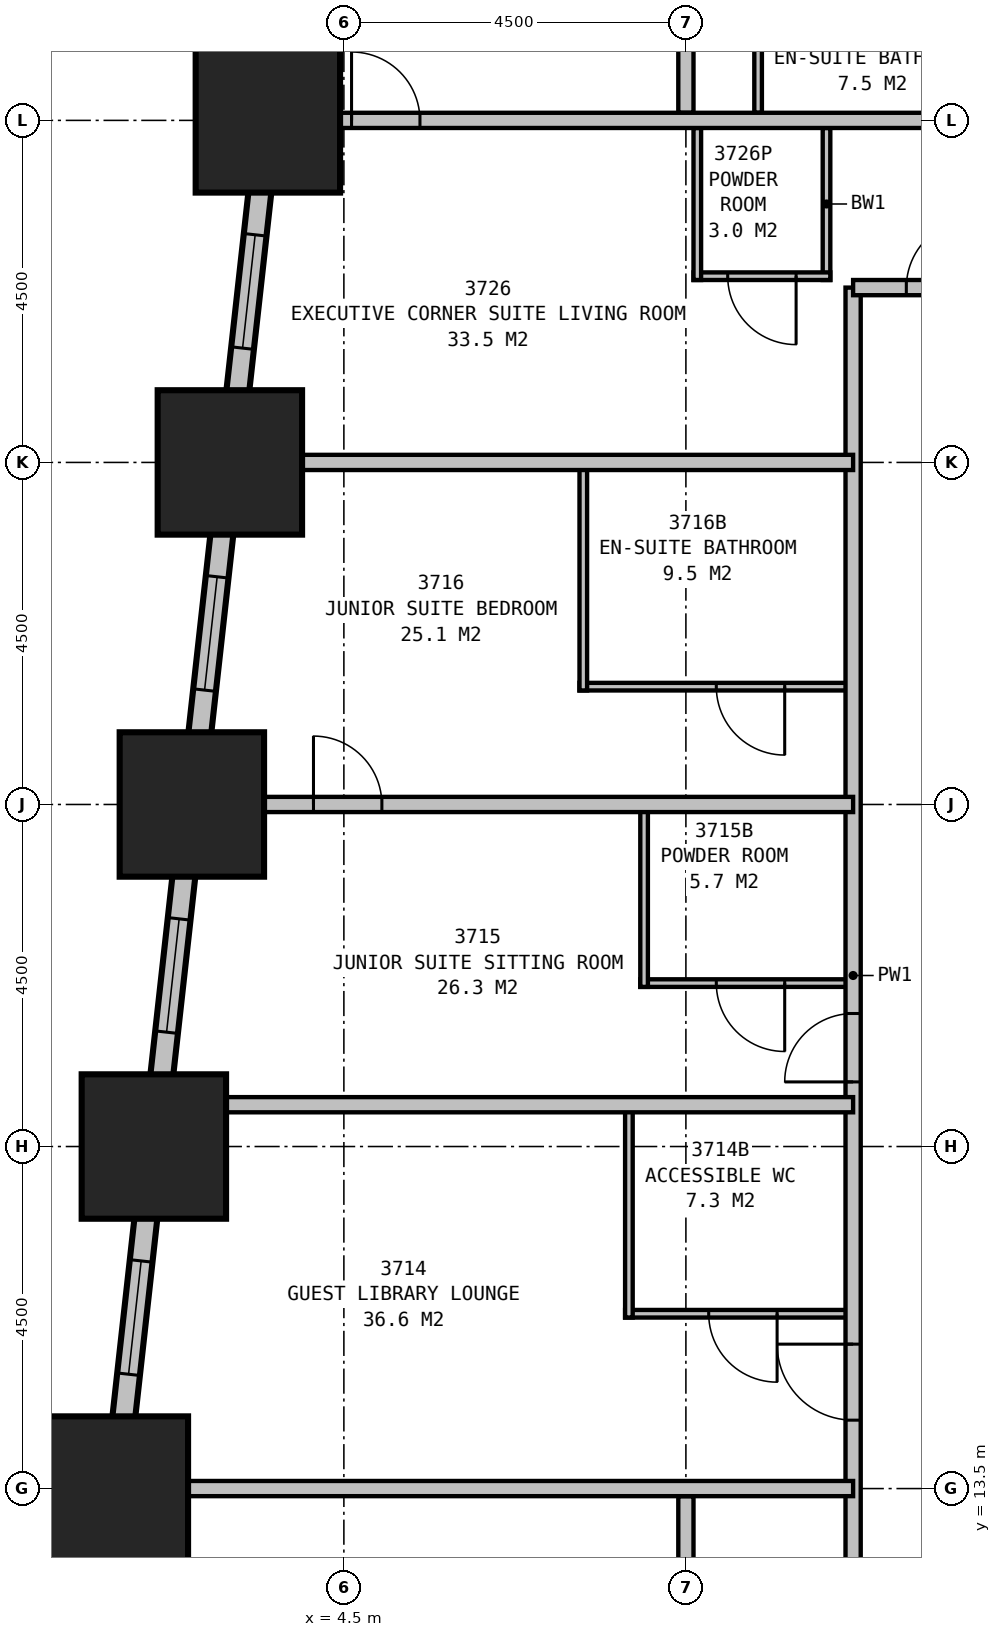
"""IFC4 building model, lengths in metres.
Left out: names, types, materials, properties, quantities, classifications, styles, units other than length and angle.
Written with IfcOpenShell. Run it as: python <this file> out.ifc"""

import sys

from ifc_helpers import new_model, si_unit, direction, frame, frame_2d, origin, origin_2d, place, context, subcontext, project, spatial, rectangle, extrude, element, fill, save


model = new_model("IFC4")
c1 = context("Model", 3, precision=1e-05, world=origin(), true_north=direction((0.0, 1.0)))
c2 = subcontext(c1, "Body", "Model", "MODEL_VIEW")
j1 = project(units=[si_unit("LENGTHUNIT", "METRE"), si_unit("PLANEANGLEUNIT", "RADIAN")], contexts=[c1])
p1 = place(None, origin())
s1 = spatial("IfcSite", under=j1, at=p1, CompositionType="ELEMENT")
p2 = place(p1, origin())
s2 = spatial("IfcBuilding", under=s1, at=p2, CompositionType="ELEMENT")
p3 = place(p2, frame((0.0, 0.0, 142.4)))
s3 = spatial("IfcBuildingStorey", under=s2, at=p3, CompositionType="ELEMENT", Elevation=142.4)
for number, where, z_axis, x_axis in (
    (1, (3.5, 31.5, 0.0), (0.0, 0.0, 1.0), (1.0, 0.0, 0.0)),
    (2, (3.0, 27.0, 0.0), (0.0, 0.0, 1.0), (1.0, 0.0, 0.0)),
    (3, (2.5, 22.5, 0.0), (0.0, 0.0, 1.0), (1.0, 0.0, 0.0)),
    (4, (2.0, 18.0, 0.0), (0.0, 0.0, 1.0), (1.0, 0.0, 0.0)),
    (5, (1.5, 13.5, 0.0), (0.0, 0.0, 1.0), (1.0, 0.0, 0.0)),
):
    element("IfcColumn", number, at=place(p3, frame(where, z_axis=z_axis, x_axis=x_axis)), inside=s3, PredefinedType="COLUMN", context=c2, shape_type="SweptSolid", body=[
        extrude(rectangle(XDim=1.9, YDim=1.9, at=origin_2d()), origin(), (0.0, 0.0, 1.0), 3.5),
    ])
p4 = place(p3, frame((4.017, 36.149, 0.0), z_axis=(0.0, 0.0, 1.0), x_axis=(-0.110433201132, -0.993883548555, 0.0)))
e6 = element("IfcWall", 6, at=p4, inside=s3, PredefinedType="STANDARD", context=c2, shape_type="SweptSolid", body=[
    extrude(rectangle(XDim=31.994, YDim=0.3, at=frame_2d((15.997, 0.0))), origin(), (0.0, 0.0, 1.0), 2.1),
])
p5 = place(p4, frame((1.664, 0.0, 0.5)))
e7 = element("IfcOpeningElement", 7, at=p5, cuts=e6, PredefinedType="OPENING", context=c2, shape_type="SweptSolid", body=[
    extrude(rectangle(XDim=1.5, YDim=1.4, at=frame_2d((0.75, 0.7))), frame((0.0, 0.16, 0.0), z_axis=(0.0, -1.0, 0.0), x_axis=(1.0, 0.0, 0.0)), (0.0, 0.0, 1.0), 0.32),
])
p6 = place(p4, frame((6.192, 0.0, 0.5)))
e8 = element("IfcOpeningElement", 8, at=p6, cuts=e6, PredefinedType="OPENING", context=c2, shape_type="SweptSolid", body=[
    extrude(rectangle(XDim=1.5, YDim=1.4, at=frame_2d((0.75, 0.7))), frame((0.0, 0.16, 0.0), z_axis=(0.0, -1.0, 0.0), x_axis=(1.0, 0.0, 0.0)), (0.0, 0.0, 1.0), 0.32),
])
p7 = place(p4, frame((10.719, 0.0, 0.5)))
e9 = element("IfcOpeningElement", 9, at=p7, cuts=e6, PredefinedType="OPENING", context=c2, shape_type="SweptSolid", body=[
    extrude(rectangle(XDim=1.5, YDim=1.4, at=frame_2d((0.75, 0.7))), frame((0.0, 0.16, 0.0), z_axis=(0.0, -1.0, 0.0), x_axis=(1.0, 0.0, 0.0)), (0.0, 0.0, 1.0), 0.32),
])
p8 = place(p4, frame((15.247, 0.0, 0.5)))
e10 = element("IfcOpeningElement", 10, at=p8, cuts=e6, PredefinedType="OPENING", context=c2, shape_type="SweptSolid", body=[
    extrude(rectangle(XDim=1.5, YDim=1.4, at=frame_2d((0.75, 0.7))), frame((0.0, 0.16, 0.0), z_axis=(0.0, -1.0, 0.0), x_axis=(1.0, 0.0, 0.0)), (0.0, 0.0, 1.0), 0.32),
])
p9 = place(p4, frame((19.775, 0.0, 0.5)))
e11 = element("IfcOpeningElement", 11, at=p9, cuts=e6, PredefinedType="OPENING", context=c2, shape_type="SweptSolid", body=[
    extrude(rectangle(XDim=1.5, YDim=1.4, at=frame_2d((0.75, 0.7))), frame((0.0, 0.16, 0.0), z_axis=(0.0, -1.0, 0.0), x_axis=(1.0, 0.0, 0.0)), (0.0, 0.0, 1.0), 0.32),
])
p10 = place(p4, frame((24.302, 0.0, 0.5)))
e12 = element("IfcOpeningElement", 12, at=p10, cuts=e6, PredefinedType="OPENING", context=c2, shape_type="SweptSolid", body=[
    extrude(rectangle(XDim=1.5, YDim=1.4, at=frame_2d((0.75, 0.7))), frame((0.0, 0.16, 0.0), z_axis=(0.0, -1.0, 0.0), x_axis=(1.0, 0.0, 0.0)), (0.0, 0.0, 1.0), 0.32),
])
p11 = place(p4, frame((28.83, 0.0, 0.5)))
e13 = element("IfcOpeningElement", 13, at=p11, cuts=e6, PredefinedType="OPENING", context=c2, shape_type="SweptSolid", body=[
    extrude(rectangle(XDim=1.5, YDim=1.4, at=frame_2d((0.75, 0.7))), frame((0.0, 0.16, 0.0), z_axis=(0.0, -1.0, 0.0), x_axis=(1.0, 0.0, 0.0)), (0.0, 0.0, 1.0), 0.32),
])
p12 = place(p3, frame((11.2, 29.3, 0.0), z_axis=(0.0, 0.0, 1.0), x_axis=(1.0, 0.0, 0.0)))
e14 = element("IfcWall", 14, at=p12, inside=s3, PredefinedType="PARTITIONING", context=c2, shape_type="SweptSolid", body=[
    extrude(rectangle(XDim=2.4, YDim=0.2, at=frame_2d((1.2, 0.0))), origin(), (0.0, 0.0, 1.0), 3.25),
])
p13 = place(p12, frame((0.7, 0.0, 0.0)))
e15 = element("IfcOpeningElement", 15, at=p13, cuts=e14, PredefinedType="OPENING", context=c2, shape_type="SweptSolid", body=[
    extrude(rectangle(XDim=0.9, YDim=2.1, at=frame_2d((0.45, 1.05))), frame((0.0, 0.11, 0.0), z_axis=(0.0, -1.0, 0.0), x_axis=(1.0, 0.0, 0.0)), (0.0, 0.0, 1.0), 0.22),
])
p14 = place(p3, frame((11.2, 11.2, 0.0), z_axis=(0.0, 0.0, 1.0), x_axis=(0.0, 1.0, 0.0)))
e16 = element("IfcWall", 16, at=p14, inside=s3, PredefinedType="PARTITIONING", context=c2, shape_type="SweptSolid", body=[
    extrude(rectangle(XDim=18.1, YDim=0.2, at=frame_2d((9.05, 0.0))), origin(), (0.0, 0.0, 1.0), 3.25),
])
p15 = place(p14, frame((3.2, 0.0, 0.0)))
e17 = element("IfcOpeningElement", 17, at=p15, cuts=e16, PredefinedType="OPENING", context=c2, shape_type="SweptSolid", body=[
    extrude(rectangle(XDim=1.0, YDim=2.1, at=frame_2d((0.5, 1.05))), frame((0.0, 0.11, 0.0), z_axis=(0.0, -1.0, 0.0), x_axis=(1.0, 0.0, 0.0)), (0.0, 0.0, 1.0), 0.22),
])
p16 = place(p14, frame((7.65, 0.0, 0.0)))
e18 = element("IfcOpeningElement", 18, at=p16, cuts=e16, PredefinedType="OPENING", context=c2, shape_type="SweptSolid", body=[
    extrude(rectangle(XDim=0.9, YDim=2.1, at=frame_2d((0.45, 1.05))), frame((0.0, 0.11, 0.0), z_axis=(0.0, -1.0, 0.0), x_axis=(1.0, 0.0, 0.0)), (0.0, 0.0, 1.0), 0.22),
])
p17 = place(p3, frame((11.2, 18.55, 0.0), z_axis=(0.0, 0.0, 1.0), x_axis=(-1.0, 0.0, 0.0)))
e19 = element("IfcWall", 19, at=p17, inside=s3, PredefinedType="PARTITIONING", context=c2, shape_type="SweptSolid", body=[
    extrude(rectangle(XDim=9.138, YDim=0.2, at=frame_2d((4.569, 0.0))), origin(), (0.0, 0.0, 1.0), 3.25),
])
p18 = place(p3, frame((11.2, 22.5, 0.0), z_axis=(0.0, 0.0, 1.0), x_axis=(-1.0, 0.0, 0.0)))
e20 = element("IfcWall", 20, at=p18, inside=s3, PredefinedType="PARTITIONING", context=c2, shape_type="SweptSolid", body=[
    extrude(rectangle(XDim=8.699, YDim=0.2, at=frame_2d((4.35, 0.0))), origin(), (0.0, 0.0, 1.0), 2.2),
])
p19 = place(p18, frame((7.1, 0.0, 0.0), z_axis=(0.0, 0.0, 1.0), x_axis=(-1.0, 0.0, 0.0)))
e21 = element("IfcOpeningElement", 21, at=p19, cuts=e20, PredefinedType="OPENING", context=c2, shape_type="SweptSolid", body=[
    extrude(rectangle(XDim=0.9, YDim=2.1, at=frame_2d((0.45, 1.05))), frame((0.0, 0.11, 0.0), z_axis=(0.0, -1.0, 0.0), x_axis=(1.0, 0.0, 0.0)), (0.0, 0.0, 1.0), 0.22),
])
p20 = place(p3, frame((8.25, 15.75, 0.0), z_axis=(0.0, 0.0, 1.0), x_axis=(0.0, 1.0, 0.0)))
e22 = element("IfcWall", 22, at=p20, inside=s3, PredefinedType="PLUMBINGWALL", context=c2, shape_type="SweptSolid", body=[
    extrude(rectangle(XDim=2.8, YDim=0.1, at=frame_2d((1.4, 0.0))), origin(), (0.0, 0.0, 1.0), 3.25),
])
p21 = place(p3, frame((11.2, 15.8, 0.0), z_axis=(0.0, 0.0, 1.0), x_axis=(-1.0, 0.0, 0.0)))
e23 = element("IfcWall", 23, at=p21, inside=s3, PredefinedType="PLUMBINGWALL", context=c2, shape_type="SweptSolid", body=[
    extrude(rectangle(XDim=3.0, YDim=0.1, at=frame_2d((1.5, 0.0))), origin(), (0.0, 0.0, 1.0), 3.25),
])
p22 = place(p21, frame((1.0, 0.0, 0.0)))
e24 = element("IfcOpeningElement", 24, at=p22, cuts=e23, PredefinedType="OPENING", context=c2, shape_type="SweptSolid", body=[
    extrude(rectangle(XDim=0.9, YDim=2.1, at=frame_2d((0.45, 1.05))), frame((0.0, 0.06, 0.0), z_axis=(0.0, -1.0, 0.0), x_axis=(1.0, 0.0, 0.0)), (0.0, 0.0, 1.0), 0.12),
])
p23 = place(p3, frame((8.45, 20.1, 0.0), z_axis=(0.0, 0.0, 1.0), x_axis=(0.0, 1.0, 0.0)))
e25 = element("IfcWall", 25, at=p23, inside=s3, PredefinedType="PLUMBINGWALL", context=c2, shape_type="SweptSolid", body=[
    extrude(rectangle(XDim=2.4, YDim=0.1, at=frame_2d((1.2, 0.0))), origin(), (0.0, 0.0, 1.0), 3.25),
])
p24 = place(p3, frame((11.2, 20.15, 0.0), z_axis=(0.0, 0.0, 1.0), x_axis=(-1.0, 0.0, 0.0)))
e26 = element("IfcWall", 26, at=p24, inside=s3, PredefinedType="PLUMBINGWALL", context=c2, shape_type="SweptSolid", body=[
    extrude(rectangle(XDim=2.8, YDim=0.1, at=frame_2d((1.4, 0.0))), origin(), (0.0, 0.0, 1.0), 3.25),
])
p25 = place(p24, frame((0.9, 0.0, 0.0)))
e27 = element("IfcOpeningElement", 27, at=p25, cuts=e26, PredefinedType="OPENING", context=c2, shape_type="SweptSolid", body=[
    extrude(rectangle(XDim=0.9, YDim=2.1, at=frame_2d((0.45, 1.05))), frame((0.0, 0.06, 0.0), z_axis=(0.0, -1.0, 0.0), x_axis=(1.0, 0.0, 0.0)), (0.0, 0.0, 1.0), 0.12),
])
p26 = place(p3, frame((7.65, 24.0, 0.0), z_axis=(0.0, 0.0, 1.0), x_axis=(0.0, 1.0, 0.0)))
e28 = element("IfcWall", 28, at=p26, inside=s3, PredefinedType="PLUMBINGWALL", context=c2, shape_type="SweptSolid", body=[
    extrude(rectangle(XDim=3.0, YDim=0.1, at=frame_2d((1.5, 0.0))), origin(), (0.0, 0.0, 1.0), 3.25),
])
p27 = place(p3, frame((11.2, 24.05, 0.0), z_axis=(0.0, 0.0, 1.0), x_axis=(-1.0, 0.0, 0.0)))
e29 = element("IfcWall", 29, at=p27, inside=s3, PredefinedType="PLUMBINGWALL", context=c2, shape_type="SweptSolid", body=[
    extrude(rectangle(XDim=3.6, YDim=0.1, at=frame_2d((1.8, 0.0))), origin(), (0.0, 0.0, 1.0), 3.25),
])
p28 = place(p27, frame((0.9, 0.0, 0.0)))
e30 = element("IfcOpeningElement", 30, at=p28, cuts=e29, PredefinedType="OPENING", context=c2, shape_type="SweptSolid", body=[
    extrude(rectangle(XDim=0.9, YDim=2.1, at=frame_2d((0.45, 1.05))), frame((0.0, 0.06, 0.0), z_axis=(0.0, -1.0, 0.0), x_axis=(1.0, 0.0, 0.0)), (0.0, 0.0, 1.0), 0.12),
])
p29 = place(p3, frame((11.2, 13.5, 0.0), z_axis=(0.0, 0.0, 1.0), x_axis=(-1.0, 0.0, 0.0)))
e31 = element("IfcWall", 31, at=p29, inside=s3, PredefinedType="PARTITIONING", context=c2, shape_type="SweptSolid", body=[
    extrude(rectangle(XDim=9.921, YDim=0.2, at=frame_2d((4.96, 0.0))), origin(), (0.0, 0.0, 1.0), 1.9),
])
p30 = place(p3, frame((9.0, 4.6, 0.0), z_axis=(0.0, 0.0, 1.0), x_axis=(0.0, 1.0, 0.0)))
e32 = element("IfcWall", 32, at=p30, inside=s3, PredefinedType="PARTITIONING", context=c2, shape_type="SweptSolid", body=[
    extrude(rectangle(XDim=8.8, YDim=0.2, at=frame_2d((4.4, 0.0))), origin(), (0.0, 0.0, 1.0), 2.2),
])
p31 = place(p30, frame((4.05, 0.0, 0.0)))
e33 = element("IfcOpeningElement", 33, at=p31, cuts=e32, PredefinedType="OPENING", context=c2, shape_type="SweptSolid", body=[
    extrude(rectangle(XDim=0.9, YDim=2.1, at=frame_2d((0.45, 1.05))), frame((0.0, 0.11, 0.0), z_axis=(0.0, -1.0, 0.0), x_axis=(1.0, 0.0, 0.0)), (0.0, 0.0, 1.0), 0.22),
])
p32 = place(p3, frame((11.2, 27.0, 0.0), z_axis=(0.0, 0.0, 1.0), x_axis=(-1.0, 0.0, 0.0)))
e34 = element("IfcWall", 34, at=p32, inside=s3, PredefinedType="PARTITIONING", context=c2, shape_type="SweptSolid", body=[
    extrude(rectangle(XDim=7.977, YDim=0.2, at=frame_2d((3.988, 0.0))), origin(), (0.0, 0.0, 1.0), 1.9),
])
p33 = place(p3, frame((13.6, 31.5, 0.0), z_axis=(0.0, 0.0, 1.0), x_axis=(-1.0, 0.0, 0.0)))
e35 = element("IfcWall", 35, at=p33, inside=s3, PredefinedType="PARTITIONING", context=c2, shape_type="SweptSolid", body=[
    extrude(rectangle(XDim=10.099, YDim=0.2, at=frame_2d((5.05, 0.0))), origin(), (0.0, 0.0, 1.0), 3.25),
])
p34 = place(p33, frame((8.999, 0.0, 0.0), z_axis=(0.0, 0.0, 1.0), x_axis=(-1.0, 0.0, 0.0)))
e36 = element("IfcOpeningElement", 36, at=p34, cuts=e35, PredefinedType="OPENING", context=c2, shape_type="SweptSolid", body=[
    extrude(rectangle(XDim=0.9, YDim=2.1, at=frame_2d((0.45, 1.05))), frame((0.0, 0.11, 0.0), z_axis=(0.0, -1.0, 0.0), x_axis=(1.0, 0.0, 0.0)), (0.0, 0.0, 1.0), 0.22),
])
p35 = place(p3, frame((9.15, 31.4, 0.0), z_axis=(0.0, 0.0, 1.0), x_axis=(0.0, -1.0, 0.0)))
e37 = element("IfcWall", 37, at=p35, inside=s3, PredefinedType="PLUMBINGWALL", context=c2, shape_type="SweptSolid", body=[
    extrude(rectangle(XDim=2.0, YDim=0.1, at=frame_2d((1.0, 0.0))), origin(), (0.0, 0.0, 1.0), 2.2),
])
p36 = place(p3, frame((10.85, 31.4, 0.0), z_axis=(0.0, 0.0, 1.0), x_axis=(0.0, -1.0, 0.0)))
e38 = element("IfcWall", 38, at=p36, inside=s3, PredefinedType="PLUMBINGWALL", context=c2, shape_type="SweptSolid", body=[
    extrude(rectangle(XDim=2.0, YDim=0.1, at=frame_2d((1.0, 0.0))), origin(), (0.0, 0.0, 1.0), 3.25),
])
p37 = place(p3, frame((10.9, 29.45, 0.0), z_axis=(0.0, 0.0, 1.0), x_axis=(-1.0, 0.0, 0.0)))
e39 = element("IfcWall", 39, at=p37, inside=s3, PredefinedType="PLUMBINGWALL", context=c2, shape_type="SweptSolid", body=[
    extrude(rectangle(XDim=1.8, YDim=0.1, at=frame_2d((0.9, 0.0))), origin(), (0.0, 0.0, 1.0), 3.25),
])
p38 = place(p37, frame((0.45, 0.0, 0.0)))
e40 = element("IfcOpeningElement", 40, at=p38, cuts=e39, PredefinedType="OPENING", context=c2, shape_type="SweptSolid", body=[
    extrude(rectangle(XDim=0.9, YDim=2.1, at=frame_2d((0.45, 1.05))), frame((0.0, 0.06, 0.0), z_axis=(0.0, -1.0, 0.0), x_axis=(1.0, 0.0, 0.0)), (0.0, 0.0, 1.0), 0.12),
])
p39 = place(p3, frame((9.0, 31.6, 0.0), z_axis=(0.0, 0.0, 1.0), x_axis=(0.0, 1.0, 0.0)))
e41 = element("IfcWall", 41, at=p39, inside=s3, PredefinedType="PARTITIONING", context=c2, shape_type="SweptSolid", body=[
    extrude(rectangle(XDim=4.4, YDim=0.2, at=frame_2d((2.2, 0.0))), origin(), (0.0, 0.0, 1.0), 2.2),
])
p40 = place(p39, frame((3.3, 0.0, 0.0), z_axis=(0.0, 0.0, 1.0), x_axis=(-1.0, 0.0, 0.0)))
e42 = element("IfcOpeningElement", 42, at=p40, cuts=e41, PredefinedType="OPENING", context=c2, shape_type="SweptSolid", body=[
    extrude(rectangle(XDim=0.9, YDim=2.1, at=frame_2d((0.45, 1.05))), frame((0.0, 0.11, 0.0), z_axis=(0.0, -1.0, 0.0), x_axis=(1.0, 0.0, 0.0)), (0.0, 0.0, 1.0), 0.22),
])
p41 = place(p3, frame((9.95, 31.6, 0.0), z_axis=(0.0, 0.0, 1.0), x_axis=(0.0, 1.0, 0.0)))
e43 = element("IfcWall", 43, at=p41, inside=s3, PredefinedType="PLUMBINGWALL", context=c2, shape_type="SweptSolid", body=[
    extrude(rectangle(XDim=2.3, YDim=0.1, at=frame_2d((1.15, 0.0))), origin(), (0.0, 0.0, 1.0), 3.25),
])
p42 = place(p6, origin())
e44 = element("IfcWindow", 44, at=p42, inside=s3, PartitioningType="SINGLE_PANEL", PredefinedType="WINDOW", context=c2, shape_type="SweptSolid", body=[
    extrude(rectangle(XDim=1.5, YDim=1.4, at=frame_2d((0.75, 0.7))), frame((0.0, 0.03, 0.0), z_axis=(0.0, -1.0, 0.0), x_axis=(1.0, 0.0, 0.0)), (0.0, 0.0, 1.0), 0.06),
])
fill(e8, e44)
p43 = place(p7, origin())
e45 = element("IfcWindow", 45, at=p43, inside=s3, PartitioningType="SINGLE_PANEL", PredefinedType="WINDOW", context=c2, shape_type="SweptSolid", body=[
    extrude(rectangle(XDim=1.5, YDim=1.4, at=frame_2d((0.75, 0.7))), frame((0.0, 0.03, 0.0), z_axis=(0.0, -1.0, 0.0), x_axis=(1.0, 0.0, 0.0)), (0.0, 0.0, 1.0), 0.06),
])
fill(e9, e45)
p44 = place(p8, origin())
e46 = element("IfcWindow", 46, at=p44, inside=s3, PartitioningType="SINGLE_PANEL", PredefinedType="WINDOW", context=c2, shape_type="SweptSolid", body=[
    extrude(rectangle(XDim=1.5, YDim=1.4, at=frame_2d((0.75, 0.7))), frame((0.0, 0.03, 0.0), z_axis=(0.0, -1.0, 0.0), x_axis=(1.0, 0.0, 0.0)), (0.0, 0.0, 1.0), 0.06),
])
fill(e10, e46)
p45 = place(p9, origin())
e47 = element("IfcWindow", 47, at=p45, inside=s3, PartitioningType="SINGLE_PANEL", PredefinedType="WINDOW", context=c2, shape_type="SweptSolid", body=[
    extrude(rectangle(XDim=1.5, YDim=1.4, at=frame_2d((0.75, 0.7))), frame((0.0, 0.03, 0.0), z_axis=(0.0, -1.0, 0.0), x_axis=(1.0, 0.0, 0.0)), (0.0, 0.0, 1.0), 0.06),
])
fill(e11, e47)
p46 = place(p13, origin())
e48 = element("IfcDoor", 48, at=p46, inside=s3, OperationType="SINGLE_SWING_RIGHT", PredefinedType="DOOR", context=c2, shape_type="SweptSolid", body=[
    extrude(rectangle(XDim=0.9, YDim=2.1, at=frame_2d((0.45, 1.05))), frame((0.0, 0.025, 0.0), z_axis=(0.0, -1.0, 0.0), x_axis=(1.0, 0.0, 0.0)), (0.0, 0.0, 1.0), 0.05),
])
fill(e15, e48)
p47 = place(p15, origin())
e49 = element("IfcDoor", 49, at=p47, inside=s3, OperationType="SINGLE_SWING_RIGHT", PredefinedType="DOOR", context=c2, shape_type="SweptSolid", body=[
    extrude(rectangle(XDim=1.0, YDim=2.1, at=frame_2d((0.5, 1.05))), frame((0.0, 0.025, 0.0), z_axis=(0.0, -1.0, 0.0), x_axis=(1.0, 0.0, 0.0)), (0.0, 0.0, 1.0), 0.05),
])
fill(e17, e49)
p48 = place(p16, origin())
e50 = element("IfcDoor", 50, at=p48, inside=s3, OperationType="SINGLE_SWING_LEFT", PredefinedType="DOOR", context=c2, shape_type="SweptSolid", body=[
    extrude(rectangle(XDim=0.9, YDim=2.1, at=frame_2d((0.45, 1.05))), frame((0.0, 0.025, 0.0), z_axis=(0.0, -1.0, 0.0), x_axis=(1.0, 0.0, 0.0)), (0.0, 0.0, 1.0), 0.05),
])
fill(e18, e50)
p49 = place(p19, origin())
e51 = element("IfcDoor", 51, at=p49, inside=s3, OperationType="SINGLE_SWING_LEFT", PredefinedType="DOOR", context=c2, shape_type="SweptSolid", body=[
    extrude(rectangle(XDim=0.9, YDim=2.1, at=frame_2d((0.45, 1.05))), frame((0.0, 0.025, 0.0), z_axis=(0.0, -1.0, 0.0), x_axis=(1.0, 0.0, 0.0)), (0.0, 0.0, 1.0), 0.05),
])
fill(e21, e51)
p50 = place(p22, origin())
e52 = element("IfcDoor", 52, at=p50, inside=s3, OperationType="SINGLE_SWING_LEFT", PredefinedType="DOOR", context=c2, shape_type="SweptSolid", body=[
    extrude(rectangle(XDim=0.9, YDim=2.1, at=frame_2d((0.45, 1.05))), frame((0.0, 0.025, 0.0), z_axis=(0.0, -1.0, 0.0), x_axis=(1.0, 0.0, 0.0)), (0.0, 0.0, 1.0), 0.05),
])
fill(e24, e52)
p51 = place(p25, origin())
e53 = element("IfcDoor", 53, at=p51, inside=s3, OperationType="SINGLE_SWING_LEFT", PredefinedType="DOOR", context=c2, shape_type="SweptSolid", body=[
    extrude(rectangle(XDim=0.9, YDim=2.1, at=frame_2d((0.45, 1.05))), frame((0.0, 0.025, 0.0), z_axis=(0.0, -1.0, 0.0), x_axis=(1.0, 0.0, 0.0)), (0.0, 0.0, 1.0), 0.05),
])
fill(e27, e53)
p52 = place(p28, origin())
e54 = element("IfcDoor", 54, at=p52, inside=s3, OperationType="SINGLE_SWING_LEFT", PredefinedType="DOOR", context=c2, shape_type="SweptSolid", body=[
    extrude(rectangle(XDim=0.9, YDim=2.1, at=frame_2d((0.45, 1.05))), frame((0.0, 0.025, 0.0), z_axis=(0.0, -1.0, 0.0), x_axis=(1.0, 0.0, 0.0)), (0.0, 0.0, 1.0), 0.05),
])
fill(e30, e54)
p53 = place(p34, origin())
e55 = element("IfcDoor", 55, at=p53, inside=s3, OperationType="SINGLE_SWING_LEFT", PredefinedType="DOOR", context=c2, shape_type="SweptSolid", body=[
    extrude(rectangle(XDim=0.9, YDim=2.1, at=frame_2d((0.45, 1.05))), frame((0.0, 0.025, 0.0), z_axis=(0.0, -1.0, 0.0), x_axis=(1.0, 0.0, 0.0)), (0.0, 0.0, 1.0), 0.05),
])
fill(e36, e55)
p54 = place(p38, origin())
e56 = element("IfcDoor", 56, at=p54, inside=s3, OperationType="SINGLE_SWING_LEFT", PredefinedType="DOOR", context=c2, shape_type="SweptSolid", body=[
    extrude(rectangle(XDim=0.9, YDim=2.1, at=frame_2d((0.45, 1.05))), frame((0.0, 0.025, 0.0), z_axis=(0.0, -1.0, 0.0), x_axis=(1.0, 0.0, 0.0)), (0.0, 0.0, 1.0), 0.05),
])
fill(e40, e56)
save(model, sys.argv[1])
